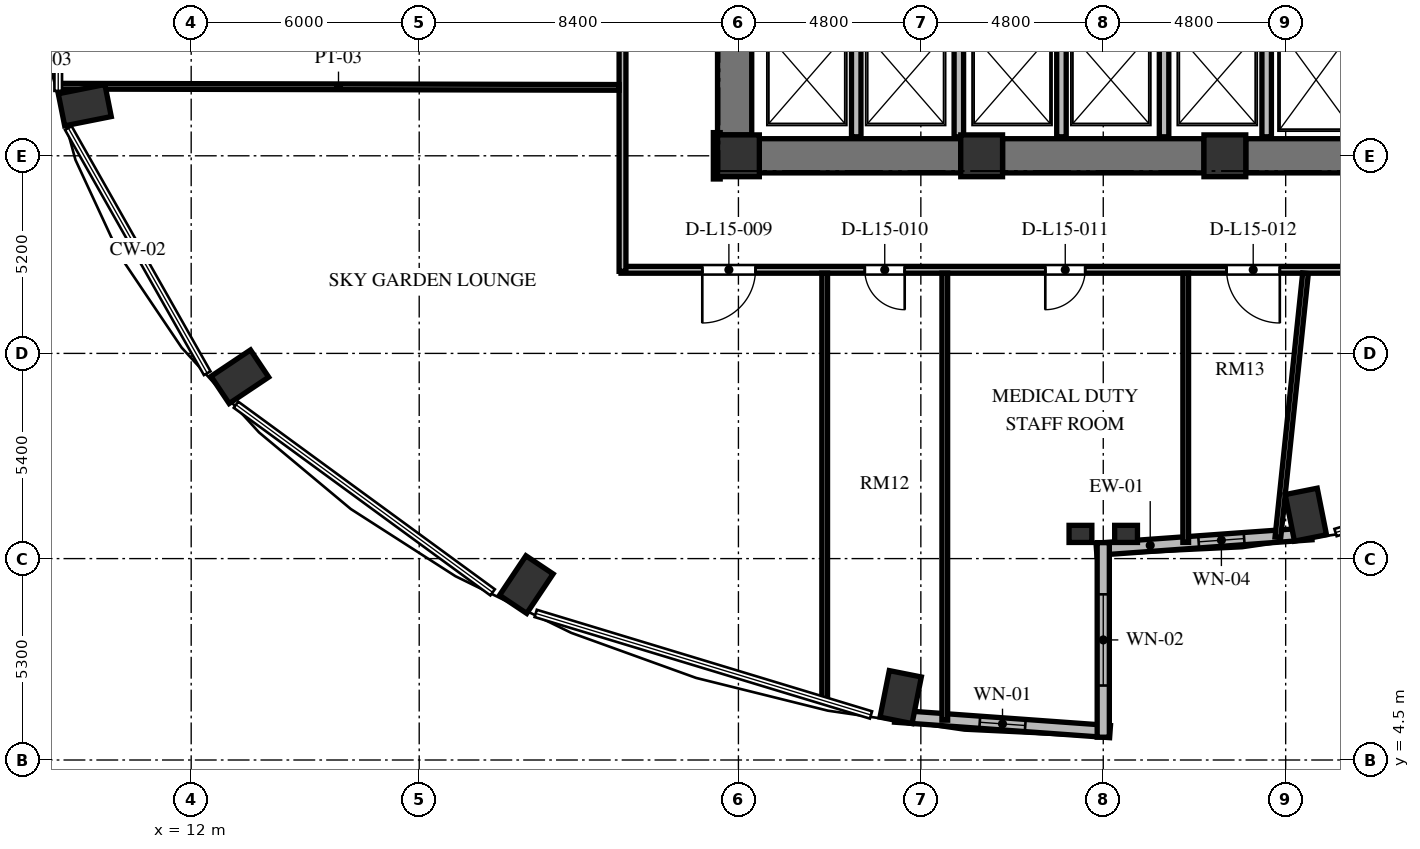
"""IFC4 building model, lengths in metres.
Left out: names, types, materials, properties, quantities, classifications, styles, units other than length and angle.
Written with IfcOpenShell. Run it as: python <this file> out.ifc"""

import sys

from ifc_helpers import new_model, si_unit, direction, frame, frame_2d, origin, origin_2d, place, context, subcontext, project, spatial, rectangle, extrude, element, fill, save


model = new_model("IFC4")
c1 = context("Model", 3, precision=1e-05, world=origin(), true_north=direction((0.0, 1.0)))
c2 = subcontext(c1, "Body", "Model", "MODEL_VIEW")
j1 = project(units=[si_unit("LENGTHUNIT", "METRE"), si_unit("PLANEANGLEUNIT", "RADIAN")], contexts=[c1])
p1 = place(None, origin())
s1 = spatial("IfcSite", under=j1, at=p1, CompositionType="ELEMENT")
p2 = place(p1, origin())
s2 = spatial("IfcBuilding", under=s1, at=p2, CompositionType="ELEMENT")
p3 = place(p2, frame((0.0, 0.0, 61.68)))
s3 = spatial("IfcBuildingStorey", under=s2, at=p3, CompositionType="ELEMENT", Elevation=61.68)
for number, where, z_axis, x_axis in (
    (1, (41.331, 10.956, 0.0), (0.0, 0.0, 1.0), (0.195, -0.981, 0.0)),
    (2, (9.2, 21.732, 0.0), (0.0, 0.0, 1.0), (-0.981, -0.195, 0.0)),
    (3, (13.28, 14.586, 0.0), (0.0, 0.0, 1.0), (-0.831, -0.556, 0.0)),
    (4, (20.819, 9.116, 0.0), (0.0, 0.0, 1.0), (-0.556, -0.831, 0.0)),
    (5, (30.669, 6.156, 0.0), (0.0, 0.0, 1.0), (-0.195, -0.981, 0.0)),
):
    element("IfcColumn", number, at=place(p3, frame(where, z_axis=z_axis, x_axis=x_axis)), inside=s3, PredefinedType="COLUMN", context=c2, shape_type="SweptSolid", body=[
        extrude(rectangle(XDim=1.25, YDim=0.86, at=origin_2d()), origin(), (0.0, 0.0, 1.0), 3.648),
    ])
for number, where, z_axis, x_axis in (
    (6, (26.4, 20.4, 0.0), (0.0, 0.0, 1.0), (1.0, 0.0, 0.0)),
    (7, (32.8, 20.4, 0.0), (0.0, 0.0, 1.0), (1.0, 0.0, 0.0)),
    (8, (39.2, 20.4, 0.0), (0.0, 0.0, 1.0), (1.0, 0.0, 0.0)),
):
    element("IfcColumn", number, at=place(p3, frame(where, z_axis=z_axis, x_axis=x_axis)), inside=s3, PredefinedType="COLUMN", context=c2, shape_type="SweptSolid", body=[
        extrude(rectangle(XDim=1.1, YDim=1.1, at=origin_2d()), origin(), (0.0, 0.0, 1.0), 3.648),
    ])
for number, where, z_axis, x_axis in (
    (9, (35.4, 10.45, 0.0), (0.0, 0.0, 1.0), (1.0, 0.0, 0.0)),
    (10, (36.6, 10.45, 0.0), (0.0, 0.0, 1.0), (1.0, 0.0, 0.0)),
):
    element("IfcColumn", number, at=place(p3, frame(where, z_axis=z_axis, x_axis=x_axis)), inside=s3, PredefinedType="PILASTER", context=c2, shape_type="SweptSolid", body=[
        extrude(rectangle(XDim=0.6, YDim=0.45, at=origin_2d()), origin(), (0.0, 0.0, 1.0), 3.648),
    ])
p4 = place(p3, frame((26.3, 20.95, 0.0), z_axis=(0.0, 0.0, 1.0), x_axis=(0.0, 1.0, 0.0)))
e11 = element("IfcWall", 11, at=p4, inside=s3, PredefinedType="SHEAR", context=c2, shape_type="SweptSolid", body=[
    extrude(rectangle(XDim=14.1, YDim=0.9, at=frame_2d((7.05, 0.0))), origin(), (0.0, 0.0, 1.0), 3.648),
])
p5 = place(p4, frame((6.5, 0.0, 0.0)))
e12 = element("IfcOpeningElement", 12, at=p5, cuts=e11, PredefinedType="OPENING", context=c2, shape_type="SweptSolid", body=[
    extrude(rectangle(XDim=1.2, YDim=2.15, at=frame_2d((0.6, 1.075))), frame((0.0, 0.46, 0.0), z_axis=(0.0, -1.0, 0.0), x_axis=(1.0, 0.0, 0.0)), (0.0, 0.0, 1.0), 0.92),
])
p6 = place(p4, frame((9.6, 0.0, 0.0)))
e13 = element("IfcOpeningElement", 13, at=p6, cuts=e11, PredefinedType="OPENING", context=c2, shape_type="SweptSolid", body=[
    extrude(rectangle(XDim=1.3, YDim=2.2, at=frame_2d((0.65, 1.1))), frame((0.0, 0.46, 0.0), z_axis=(0.0, -1.0, 0.0), x_axis=(1.0, 0.0, 0.0)), (0.0, 0.0, 1.0), 0.92),
])
p7 = place(p4, frame((3.26, 0.0, 0.0)))
e14 = element("IfcOpeningElement", 14, at=p7, cuts=e11, PredefinedType="OPENING", context=c2, shape_type="SweptSolid", body=[
    extrude(rectangle(XDim=1.3, YDim=2.2, at=frame_2d((0.65, 1.1))), frame((0.0, 0.46, 0.0), z_axis=(0.0, -1.0, 0.0), x_axis=(1.0, 0.0, 0.0)), (0.0, 0.0, 1.0), 0.92),
])
p8 = place(p3, frame((26.95, 20.4, 0.0), z_axis=(0.0, 0.0, 1.0), x_axis=(1.0, 0.0, 0.0)))
e15 = element("IfcWall", 15, at=p8, inside=s3, PredefinedType="SHEAR", context=c2, shape_type="SweptSolid", body=[
    extrude(rectangle(XDim=5.3, YDim=0.9, at=frame_2d((2.65, 0.0))), origin(), (0.0, 0.0, 1.0), 3.648),
])
p9 = place(p3, frame((33.35, 20.4, 0.0), z_axis=(0.0, 0.0, 1.0), x_axis=(1.0, 0.0, 0.0)))
e16 = element("IfcWall", 16, at=p9, inside=s3, PredefinedType="SHEAR", context=c2, shape_type="SweptSolid", body=[
    extrude(rectangle(XDim=5.3, YDim=0.9, at=frame_2d((2.65, 0.0))), origin(), (0.0, 0.0, 1.0), 3.648),
])
p10 = place(p3, frame((39.75, 20.4, 0.0), z_axis=(0.0, 0.0, 1.0), x_axis=(1.0, 0.0, 0.0)))
e17 = element("IfcWall", 17, at=p10, inside=s3, PredefinedType="SHEAR", context=c2, shape_type="SweptSolid", body=[
    extrude(rectangle(XDim=5.3, YDim=0.9, at=frame_2d((2.65, 0.0))), origin(), (0.0, 0.0, 1.0), 3.648),
])
p11 = place(p3, frame((35.821, 10.047, 0.0), z_axis=(0.0, 0.0, 1.0), x_axis=(0.997422321809, 0.071754525696, 0.0)))
e18 = element("IfcWall", 18, at=p11, inside=s3, PredefinedType="SOLIDWALL", context=c2, shape_type="SweptSolid", body=[
    extrude(rectangle(XDim=5.675, YDim=0.32, at=frame_2d((2.838, 0.0))), origin(), (0.0, 0.0, 1.0), 3.428),
])
p12 = place(p11, frame((2.697, 0.0, 0.85)))
e19 = element("IfcOpeningElement", 19, at=p12, cuts=e18, PredefinedType="OPENING", context=c2, shape_type="SweptSolid", body=[
    extrude(rectangle(XDim=1.2, YDim=1.8, at=frame_2d((0.6, 0.9))), frame((0.0, 0.17, 0.0), z_axis=(0.0, -1.0, 0.0), x_axis=(1.0, 0.0, 0.0)), (0.0, 0.0, 1.0), 0.34),
])
p13 = place(p3, frame((30.519, 5.654, 0.0), z_axis=(0.0, 0.0, 1.0), x_axis=(0.997421878774, -0.071760683825, 0.0)))
e20 = element("IfcWall", 20, at=p13, inside=s3, PredefinedType="SOLIDWALL", context=c2, shape_type="SweptSolid", body=[
    extrude(rectangle(XDim=5.675, YDim=0.32, at=frame_2d((2.837, 0.0))), origin(), (0.0, 0.0, 1.0), 3.428),
])
p14 = place(p13, frame((2.237, 0.0, 0.85)))
e21 = element("IfcOpeningElement", 21, at=p14, cuts=e20, PredefinedType="OPENING", context=c2, shape_type="SweptSolid", body=[
    extrude(rectangle(XDim=1.2, YDim=2.2, at=frame_2d((0.6, 1.1))), frame((0.0, 0.17, 0.0), z_axis=(0.0, -1.0, 0.0), x_axis=(1.0, 0.0, 0.0)), (0.0, 0.0, 1.0), 0.34),
])
p15 = place(p3, frame((36.0, 5.1, 0.0), z_axis=(0.0, 0.0, 1.0), x_axis=(0.0, 1.0, 0.0)))
e22 = element("IfcWall", 22, at=p15, inside=s3, PredefinedType="SOLIDWALL", context=c2, shape_type="SweptSolid", body=[
    extrude(rectangle(XDim=5.12, YDim=0.32, at=frame_2d((2.56, 0.0))), origin(), (0.0, 0.0, 1.0), 3.428),
])
p16 = place(p15, frame((1.36, 0.0, 0.84)))
e23 = element("IfcOpeningElement", 23, at=p16, cuts=e22, PredefinedType="OPENING", context=c2, shape_type="SweptSolid", body=[
    extrude(rectangle(XDim=2.4, YDim=2.04, at=frame_2d((1.2, 1.02))), frame((0.0, 0.17, 0.0), z_axis=(0.0, -1.0, 0.0), x_axis=(1.0, 0.0, 0.0)), (0.0, 0.0, 1.0), 0.34),
])
for number, where, z_axis, x_axis in (
    (24, (29.5, 20.9, 0.0), (0.0, 0.0, 1.0), (0.0, 1.0, 0.0)),
    (25, (32.2, 20.9, 0.0), (0.0, 0.0, 1.0), (0.0, 1.0, 0.0)),
    (26, (34.9, 20.9, 0.0), (0.0, 0.0, 1.0), (0.0, 1.0, 0.0)),
    (27, (37.6, 20.9, 0.0), (0.0, 0.0, 1.0), (0.0, 1.0, 0.0)),
    (28, (40.3, 20.9, 0.0), (0.0, 0.0, 1.0), (0.0, 1.0, 0.0)),
):
    element("IfcWall", number, at=place(p3, frame(where, z_axis=z_axis, x_axis=x_axis)), inside=s3, PredefinedType="SOLIDWALL", context=c2, shape_type="SweptSolid", body=[
        extrude(rectangle(XDim=2.8, YDim=0.25, at=frame_2d((1.4, 0.0))), origin(), (0.0, 0.0, 1.0), 3.428),
    ])
p17 = place(p3, frame((25.83, 21.01, 0.0), z_axis=(0.0, 0.0, 1.0), x_axis=(0.0, -1.0, 0.0)))
e29 = element("IfcWall", 29, at=p17, inside=s3, PredefinedType="PARTITIONING", context=c2, shape_type="SweptSolid", body=[
    extrude(rectangle(XDim=1.22, YDim=0.18, at=frame_2d((0.61, 0.0))), origin(), (0.0, 0.0, 1.0), 3.428),
])
p18 = place(p3, frame((45.24, 17.4, 0.0), z_axis=(0.0, 0.0, 1.0), x_axis=(-1.0, 0.0, 0.0)))
e30 = element("IfcWall", 30, at=p18, inside=s3, PredefinedType="PARTITIONING", context=c2, shape_type="SweptSolid", body=[
    extrude(rectangle(XDim=21.93, YDim=0.18, at=frame_2d((10.965, 0.0))), origin(), (0.0, 0.0, 1.0), 3.053),
])
p19 = place(p18, frame((18.391, 0.0, 0.0)))
e31 = element("IfcOpeningElement", 31, at=p19, cuts=e30, PredefinedType="OPENING", context=c2, shape_type="SweptSolid", body=[
    extrude(rectangle(XDim=1.4, YDim=2.2, at=frame_2d((0.7, 1.1))), frame((0.0, 0.1, 0.0), z_axis=(0.0, -1.0, 0.0), x_axis=(1.0, 0.0, 0.0)), (0.0, 0.0, 1.0), 0.2),
])
p20 = place(p18, frame((14.465, 0.0, 0.0)))
e32 = element("IfcOpeningElement", 32, at=p20, cuts=e30, PredefinedType="OPENING", context=c2, shape_type="SweptSolid", body=[
    extrude(rectangle(XDim=1.05, YDim=2.15, at=frame_2d((0.525, 1.075))), frame((0.0, 0.1, 0.0), z_axis=(0.0, -1.0, 0.0), x_axis=(1.0, 0.0, 0.0)), (0.0, 0.0, 1.0), 0.2),
])
p21 = place(p18, frame((9.715, 0.0, 0.0)))
e33 = element("IfcOpeningElement", 33, at=p21, cuts=e30, PredefinedType="OPENING", context=c2, shape_type="SweptSolid", body=[
    extrude(rectangle(XDim=1.05, YDim=2.15, at=frame_2d((0.525, 1.075))), frame((0.0, 0.1, 0.0), z_axis=(0.0, -1.0, 0.0), x_axis=(1.0, 0.0, 0.0)), (0.0, 0.0, 1.0), 0.2),
])
p22 = place(p18, frame((4.594, 0.0, 0.0)))
e34 = element("IfcOpeningElement", 34, at=p22, cuts=e30, PredefinedType="OPENING", context=c2, shape_type="SweptSolid", body=[
    extrude(rectangle(XDim=1.4, YDim=2.2, at=frame_2d((0.7, 1.1))), frame((0.0, 0.1, 0.0), z_axis=(0.0, -1.0, 0.0), x_axis=(1.0, 0.0, 0.0)), (0.0, 0.0, 1.0), 0.2),
])
p23 = place(p3, frame((23.35, 17.36, 0.0), z_axis=(0.0, 0.0, 1.0), x_axis=(0.0, 1.0, 0.0)))
e35 = element("IfcWall", 35, at=p23, inside=s3, PredefinedType="PARTITIONING", context=c2, shape_type="SweptSolid", body=[
    extrude(rectangle(XDim=9.28, YDim=0.18, at=frame_2d((4.64, 0.0))), origin(), (0.0, 0.0, 1.0), 3.428),
])
p24 = place(p3, frame((8.493, 22.231, 0.0), z_axis=(0.0, 0.0, 1.0), x_axis=(0.999997760873, -0.002116187438, 0.0)))
e36 = element("IfcWall", 36, at=p24, inside=s3, PredefinedType="PARTITIONING", context=c2, shape_type="SweptSolid", body=[
    extrude(rectangle(XDim=14.767, YDim=0.15, at=frame_2d((7.384, 0.0))), origin(), (0.0, 0.0, 1.0), 3.428),
])
p25 = place(p3, frame((28.67, 6.067, 0.0), z_axis=(0.0, 0.0, 1.0), x_axis=(0.0, 1.0, 0.0)))
e37 = element("IfcWall", 37, at=p25, inside=s3, PredefinedType="PARTITIONING", context=c2, shape_type="SweptSolid", body=[
    extrude(rectangle(XDim=11.243, YDim=0.15, at=frame_2d((5.622, 0.0))), origin(), (0.0, 0.0, 1.0), 3.428),
])
p26 = place(p3, frame((31.83, 5.548, 0.0), z_axis=(0.0, 0.0, 1.0), x_axis=(0.0, 1.0, 0.0)))
e38 = element("IfcWall", 38, at=p26, inside=s3, PredefinedType="PARTITIONING", context=c2, shape_type="SweptSolid", body=[
    extrude(rectangle(XDim=11.762, YDim=0.15, at=frame_2d((5.881, 0.0))), origin(), (0.0, 0.0, 1.0), 2.813),
])
p27 = place(p3, frame((38.17, 10.227, 0.0), z_axis=(0.0, 0.0, 1.0), x_axis=(0.0, 1.0, 0.0)))
e39 = element("IfcWall", 39, at=p27, inside=s3, PredefinedType="PARTITIONING", context=c2, shape_type="SweptSolid", body=[
    extrude(rectangle(XDim=7.083, YDim=0.15, at=frame_2d((3.542, 0.0))), origin(), (0.0, 0.0, 1.0), 3.428),
])
p28 = place(p3, frame((40.595, 10.359, 0.0), z_axis=(0.0, 0.0, 1.0), x_axis=(0.104057453244, 0.994571287754, 0.0)))
e40 = element("IfcWall", 40, at=p28, inside=s3, PredefinedType="PARTITIONING", context=c2, shape_type="SweptSolid", body=[
    extrude(rectangle(XDim=6.989, YDim=0.15, at=frame_2d((3.495, 0.0))), origin(), (0.0, 0.0, 1.0), 3.428),
])
p29 = place(p12, origin())
e41 = element("IfcWindow", 41, at=p29, inside=s3, PartitioningType="SINGLE_PANEL", PredefinedType="WINDOW", context=c2, shape_type="SweptSolid", body=[
    extrude(rectangle(XDim=1.2, YDim=1.8, at=frame_2d((0.6, 0.9))), frame((0.0, 0.03, 0.0), z_axis=(0.0, -1.0, 0.0), x_axis=(1.0, 0.0, 0.0)), (0.0, 0.0, 1.0), 0.06),
])
fill(e19, e41)
p30 = place(p14, origin())
e42 = element("IfcWindow", 42, at=p30, inside=s3, PartitioningType="SINGLE_PANEL", PredefinedType="WINDOW", context=c2, shape_type="SweptSolid", body=[
    extrude(rectangle(XDim=1.2, YDim=2.2, at=frame_2d((0.6, 1.1))), frame((0.0, 0.03, 0.0), z_axis=(0.0, -1.0, 0.0), x_axis=(1.0, 0.0, 0.0)), (0.0, 0.0, 1.0), 0.06),
])
fill(e21, e42)
p31 = place(p16, origin())
e43 = element("IfcWindow", 43, at=p31, inside=s3, PartitioningType="SINGLE_PANEL", PredefinedType="WINDOW", context=c2, shape_type="SweptSolid", body=[
    extrude(rectangle(XDim=2.4, YDim=2.04, at=frame_2d((1.2, 1.02))), frame((0.0, 0.03, 0.0), z_axis=(0.0, -1.0, 0.0), x_axis=(1.0, 0.0, 0.0)), (0.0, 0.0, 1.0), 0.06),
])
fill(e23, e43)
p32 = place(p19, origin())
e44 = element("IfcDoor", 44, at=p32, inside=s3, OperationType="SINGLE_SWING_RIGHT", PredefinedType="DOOR", context=c2, shape_type="SweptSolid", body=[
    extrude(rectangle(XDim=1.4, YDim=2.2, at=frame_2d((0.7, 1.1))), frame((0.0, 0.025, 0.0), z_axis=(0.0, -1.0, 0.0), x_axis=(1.0, 0.0, 0.0)), (0.0, 0.0, 1.0), 0.05),
])
fill(e31, e44)
p33 = place(p20, origin())
e45 = element("IfcDoor", 45, at=p33, inside=s3, OperationType="SINGLE_SWING_LEFT", PredefinedType="DOOR", context=c2, shape_type="SweptSolid", body=[
    extrude(rectangle(XDim=1.05, YDim=2.15, at=frame_2d((0.525, 1.075))), frame((0.0, 0.025, 0.0), z_axis=(0.0, -1.0, 0.0), x_axis=(1.0, 0.0, 0.0)), (0.0, 0.0, 1.0), 0.05),
])
fill(e32, e45)
p34 = place(p21, origin())
e46 = element("IfcDoor", 46, at=p34, inside=s3, OperationType="SINGLE_SWING_RIGHT", PredefinedType="DOOR", context=c2, shape_type="SweptSolid", body=[
    extrude(rectangle(XDim=1.05, YDim=2.15, at=frame_2d((0.525, 1.075))), frame((0.0, 0.025, 0.0), z_axis=(0.0, -1.0, 0.0), x_axis=(1.0, 0.0, 0.0)), (0.0, 0.0, 1.0), 0.05),
])
fill(e33, e46)
p35 = place(p22, origin())
e47 = element("IfcDoor", 47, at=p35, inside=s3, OperationType="SINGLE_SWING_LEFT", PredefinedType="DOOR", context=c2, shape_type="SweptSolid", body=[
    extrude(rectangle(XDim=1.4, YDim=2.2, at=frame_2d((0.7, 1.1))), frame((0.0, 0.025, 0.0), z_axis=(0.0, -1.0, 0.0), x_axis=(1.0, 0.0, 0.0)), (0.0, 0.0, 1.0), 0.05),
])
fill(e34, e47)
save(model, sys.argv[1])
